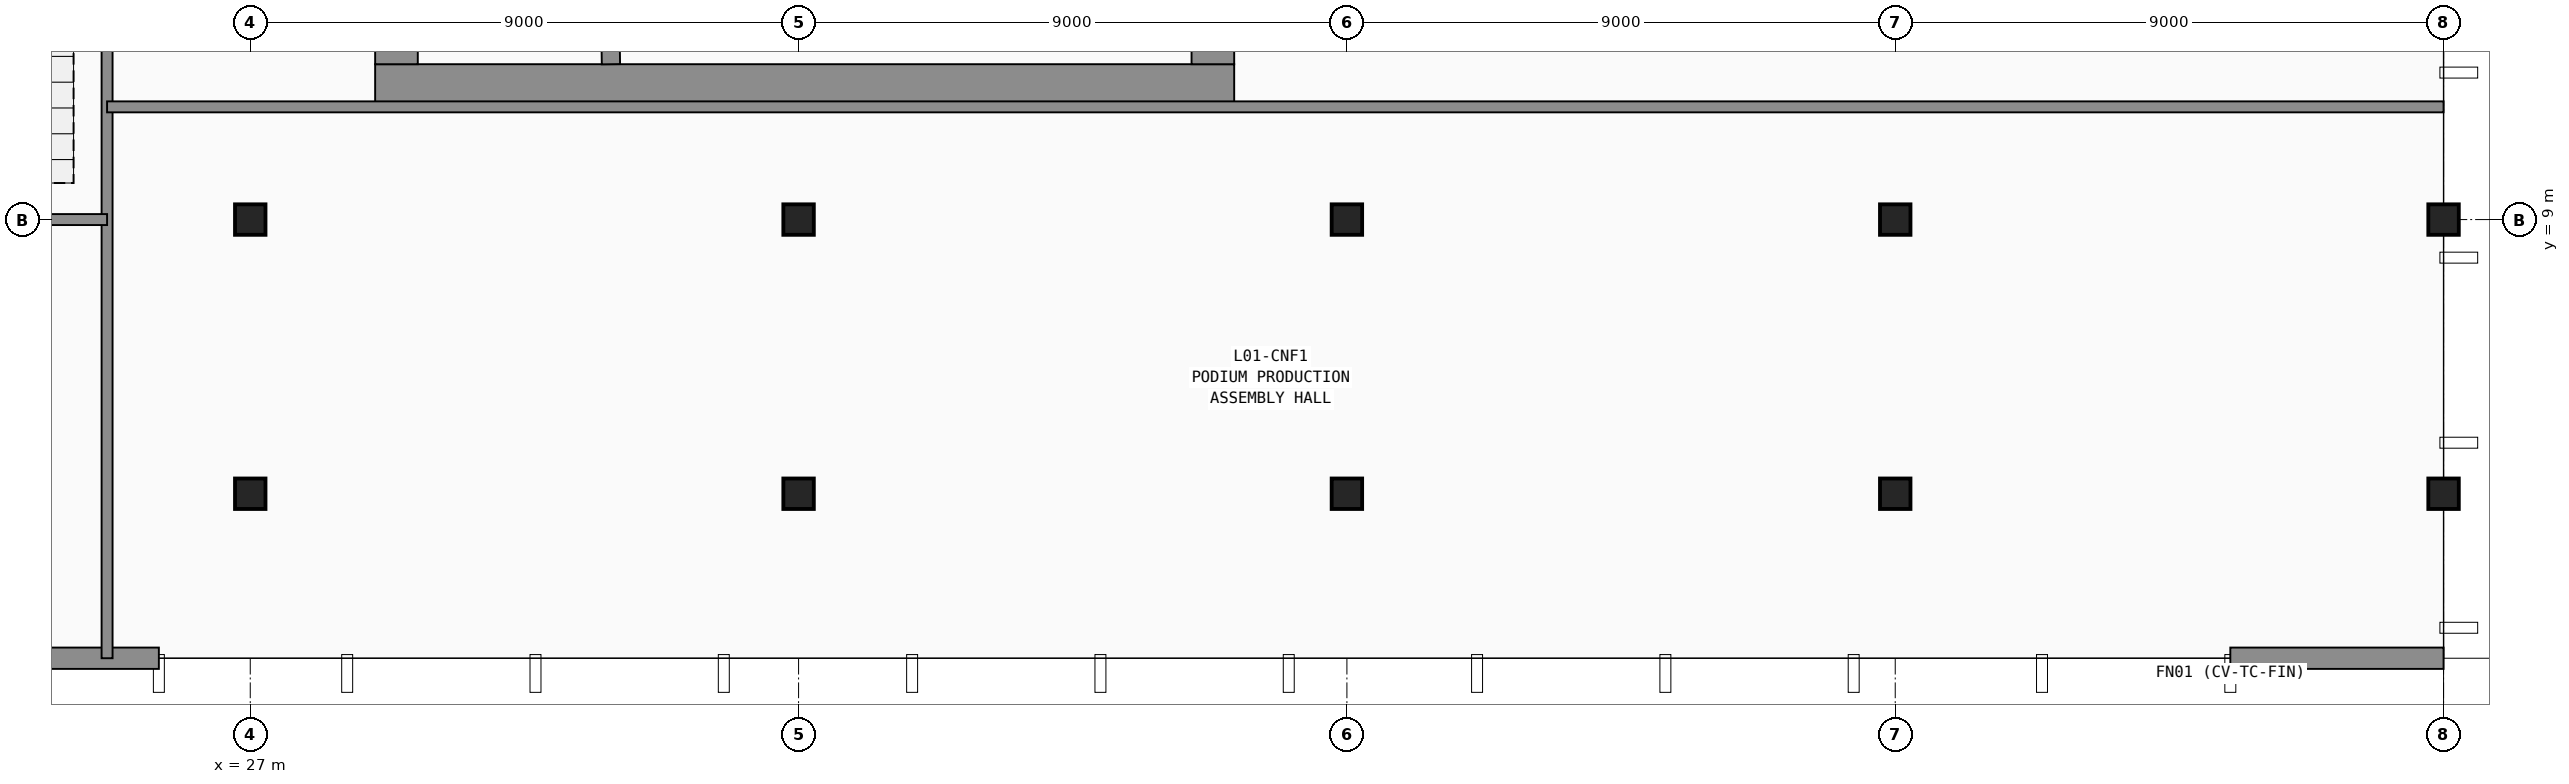
"""IFC4 building model, lengths in metres.
Left out: names, types, materials, properties, quantities, classifications, styles, units other than length and angle.
Written with IfcOpenShell. Run it as: python <this file> out.ifc"""

import sys

from ifc_helpers import new_model, si_unit, direction, frame, frame_2d, origin, origin_2d, place, context, subcontext, project, spatial, rectangle, i_section, extrude, element, fill, save


model = new_model("IFC4")
c1 = context("Model", 3, precision=1e-05, world=origin(), true_north=direction((0.0, 1.0)))
c2 = subcontext(c1, "Body", "Model", "MODEL_VIEW")
j1 = project(units=[si_unit("LENGTHUNIT", "METRE"), si_unit("PLANEANGLEUNIT", "RADIAN")], contexts=[c1])
p1 = place(None, origin())
s1 = spatial("IfcSite", under=j1, at=p1, CompositionType="ELEMENT")
p2 = place(p1, origin())
s2 = spatial("IfcBuilding", under=s1, at=p2, CompositionType="ELEMENT")
p3 = place(p2, frame((0.0, 0.0, 5.8)))
s3 = spatial("IfcBuildingStorey", under=s2, at=p3, CompositionType="ELEMENT", Elevation=5.8)
for number, where, z_axis, x_axis in (
    (1, (27.0, 9.0, 0.0), (0.0, 0.0, 1.0), (1.0, 0.0, 0.0)),
    (2, (36.0, 9.0, 0.0), (0.0, 0.0, 1.0), (1.0, 0.0, 0.0)),
    (3, (45.0, 9.0, 0.0), (0.0, 0.0, 1.0), (1.0, 0.0, 0.0)),
    (4, (54.0, 9.0, 0.0), (0.0, 0.0, 1.0), (1.0, 0.0, 0.0)),
    (5, (63.0, 9.0, 0.0), (0.0, 0.0, 1.0), (1.0, 0.0, 0.0)),
    (6, (27.0, 4.5, 0.0), (0.0, 0.0, 1.0), (1.0, 0.0, 0.0)),
    (7, (36.0, 4.5, 0.0), (0.0, 0.0, 1.0), (1.0, 0.0, 0.0)),
    (8, (45.0, 4.5, 0.0), (0.0, 0.0, 1.0), (1.0, 0.0, 0.0)),
    (9, (54.0, 4.5, 0.0), (0.0, 0.0, 1.0), (1.0, 0.0, 0.0)),
    (10, (63.0, 4.5, 0.0), (0.0, 0.0, 1.0), (1.0, 0.0, 0.0)),
):
    element("IfcColumn", number, at=place(p3, frame(where, z_axis=z_axis, x_axis=x_axis)), inside=s3, PredefinedType="COLUMN", context=c2, shape_type="SweptSolid", body=[
        extrude(i_section(OverallWidth=0.442, OverallDepth=0.531, WebThickness=0.066, FlangeThickness=0.106, FilletRadius=0.015, at=origin_2d()), origin(), (0.0, 0.0, 1.0), 5.2),
    ])
p4 = place(p3, frame((25.5, 1.8, 0.0), z_axis=(0.0, 0.0, 1.0), x_axis=(-1.0, 0.0, 0.0)))
e11 = element("IfcWall", 11, at=p4, inside=s3, PredefinedType="SOLIDWALL", context=c2, shape_type="SweptSolid", body=[
    extrude(rectangle(XDim=5.1, YDim=0.35, at=frame_2d((2.55, 0.0))), origin(), (0.0, 0.0, 1.0), 4.88),
])
p5 = place(p3, frame((63.0, 1.8, 0.0), z_axis=(0.0, 0.0, 1.0), x_axis=(-1.0, 0.0, 0.0)))
e12 = element("IfcWall", 12, at=p5, inside=s3, PredefinedType="SOLIDWALL", context=c2, shape_type="SweptSolid", body=[
    extrude(rectangle(XDim=3.5, YDim=0.35, at=frame_2d((1.75, 0.0))), origin(), (0.0, 0.0, 1.0), 4.88),
])
p6 = place(p3, frame((29.05, 11.2, 0.0), z_axis=(0.0, 0.0, 1.0), x_axis=(1.0, 0.0, 0.0)))
e13 = element("IfcWall", 13, at=p6, inside=s3, PredefinedType="SHEAR", context=c2, shape_type="SweptSolid", body=[
    extrude(rectangle(XDim=14.1, YDim=0.7, at=frame_2d((7.05, 0.0))), origin(), (0.0, 0.0, 1.0), 4.88),
])
p7 = place(p3, frame((29.4, 24.25, 0.0), z_axis=(0.0, 0.0, 1.0), x_axis=(0.0, -1.0, 0.0)))
e14 = element("IfcWall", 14, at=p7, inside=s3, PredefinedType="SHEAR", context=c2, shape_type="SweptSolid", body=[
    extrude(rectangle(XDim=12.7, YDim=0.7, at=frame_2d((6.35, 0.0))), origin(), (0.0, 0.0, 1.0), 4.88),
])
p8 = place(p7, frame((1.35, 0.0, 0.0)))
e15 = element("IfcOpeningElement", 15, at=p8, cuts=e14, PredefinedType="OPENING", context=c2, shape_type="SweptSolid", body=[
    extrude(rectangle(XDim=1.35, YDim=2.15, at=frame_2d((0.675, 1.075))), frame((0.0, 0.36, 0.0), z_axis=(0.0, -1.0, 0.0), x_axis=(1.0, 0.0, 0.0)), (0.0, 0.0, 1.0), 0.72),
])
p9 = place(p3, frame((42.8, 11.55, 0.0), z_axis=(0.0, 0.0, 1.0), x_axis=(0.0, 1.0, 0.0)))
e16 = element("IfcWall", 16, at=p9, inside=s3, PredefinedType="SHEAR", context=c2, shape_type="SweptSolid", body=[
    extrude(rectangle(XDim=12.7, YDim=0.7, at=frame_2d((6.35, 0.0))), origin(), (0.0, 0.0, 1.0), 4.88),
])
p10 = place(p3, frame((32.92, 11.55, 0.0), z_axis=(0.0, 0.0, 1.0), x_axis=(-0.01331804616, 0.99991131089, 0.0)))
e17 = element("IfcWall", 17, at=p10, inside=s3, PredefinedType="SHEAR", context=c2, shape_type="SweptSolid", body=[
    extrude(rectangle(XDim=9.001, YDim=0.3, at=frame_2d((4.5, 0.0))), origin(), (0.0, 0.0, 1.0), 4.88),
])
p11 = place(p3, frame((24.65, 1.8, 0.0), z_axis=(0.0, 0.0, 1.0), x_axis=(0.0, 1.0, 0.0)))
e18 = element("IfcWall", 18, at=p11, inside=s3, PredefinedType="PARTITIONING", context=c2, shape_type="SweptSolid", body=[
    extrude(rectangle(XDim=26.4, YDim=0.18, at=frame_2d((13.2, 0.0))), origin(), (0.0, 0.0, 1.0), 3.912),
])
p12 = place(p11, frame((12.2, 0.0, 0.0)))
e19 = element("IfcOpeningElement", 19, at=p12, cuts=e18, PredefinedType="OPENING", context=c2, shape_type="SweptSolid", body=[
    extrude(rectangle(XDim=1.4, YDim=2.15, at=frame_2d((0.7, 1.075))), frame((0.0, 0.1, 0.0), z_axis=(0.0, -1.0, 0.0), x_axis=(1.0, 0.0, 0.0)), (0.0, 0.0, 1.0), 0.2),
])
p13 = place(p3, frame((24.65, 10.85, 0.0), z_axis=(0.0, 0.0, 1.0), x_axis=(1.0, 0.0, 0.0)))
e20 = element("IfcWall", 20, at=p13, inside=s3, PredefinedType="PARTITIONING", context=c2, shape_type="SweptSolid", body=[
    extrude(rectangle(XDim=38.35, YDim=0.18, at=frame_2d((19.175, 0.0))), origin(), (0.0, 0.0, 1.0), 4.005),
])
p14 = place(p13, frame((2.0, 0.0, 0.0)))
e21 = element("IfcOpeningElement", 21, at=p14, cuts=e20, PredefinedType="OPENING", context=c2, shape_type="SweptSolid", body=[
    extrude(rectangle(XDim=1.2, YDim=2.15, at=frame_2d((0.6, 1.075))), frame((0.0, 0.1, 0.0), z_axis=(0.0, -1.0, 0.0), x_axis=(1.0, 0.0, 0.0)), (0.0, 0.0, 1.0), 0.2),
])
p15 = place(p3, frame((1.8, 9.0, 0.0), z_axis=(0.0, 0.0, 1.0), x_axis=(1.0, 0.0, 0.0)))
e22 = element("IfcWall", 22, at=p15, inside=s3, PredefinedType="PARTITIONING", context=c2, shape_type="SweptSolid", body=[
    extrude(rectangle(XDim=22.85, YDim=0.18, at=frame_2d((11.425, 0.0))), origin(), (0.0, 0.0, 1.0), 3.933),
])
p16 = place(p15, frame((11.7, 0.0, 0.0)))
e23 = element("IfcOpeningElement", 23, at=p16, cuts=e22, PredefinedType="OPENING", context=c2, shape_type="SweptSolid", body=[
    extrude(rectangle(XDim=1.0, YDim=2.1, at=frame_2d((0.5, 1.05))), frame((0.0, 0.1, 0.0), z_axis=(0.0, -1.0, 0.0), x_axis=(1.0, 0.0, 0.0)), (0.0, 0.0, 1.0), 0.2),
])
p17 = place(p14, origin())
e24 = element("IfcDoor", 24, at=p17, inside=s3, OperationType="SINGLE_SWING_RIGHT", PredefinedType="DOOR", context=c2, shape_type="SweptSolid", body=[
    extrude(rectangle(XDim=1.2, YDim=2.15, at=frame_2d((0.6, 1.075))), frame((0.0, 0.025, 0.0), z_axis=(0.0, -1.0, 0.0), x_axis=(1.0, 0.0, 0.0)), (0.0, 0.0, 1.0), 0.05),
])
fill(e21, e24)
save(model, sys.argv[1])
